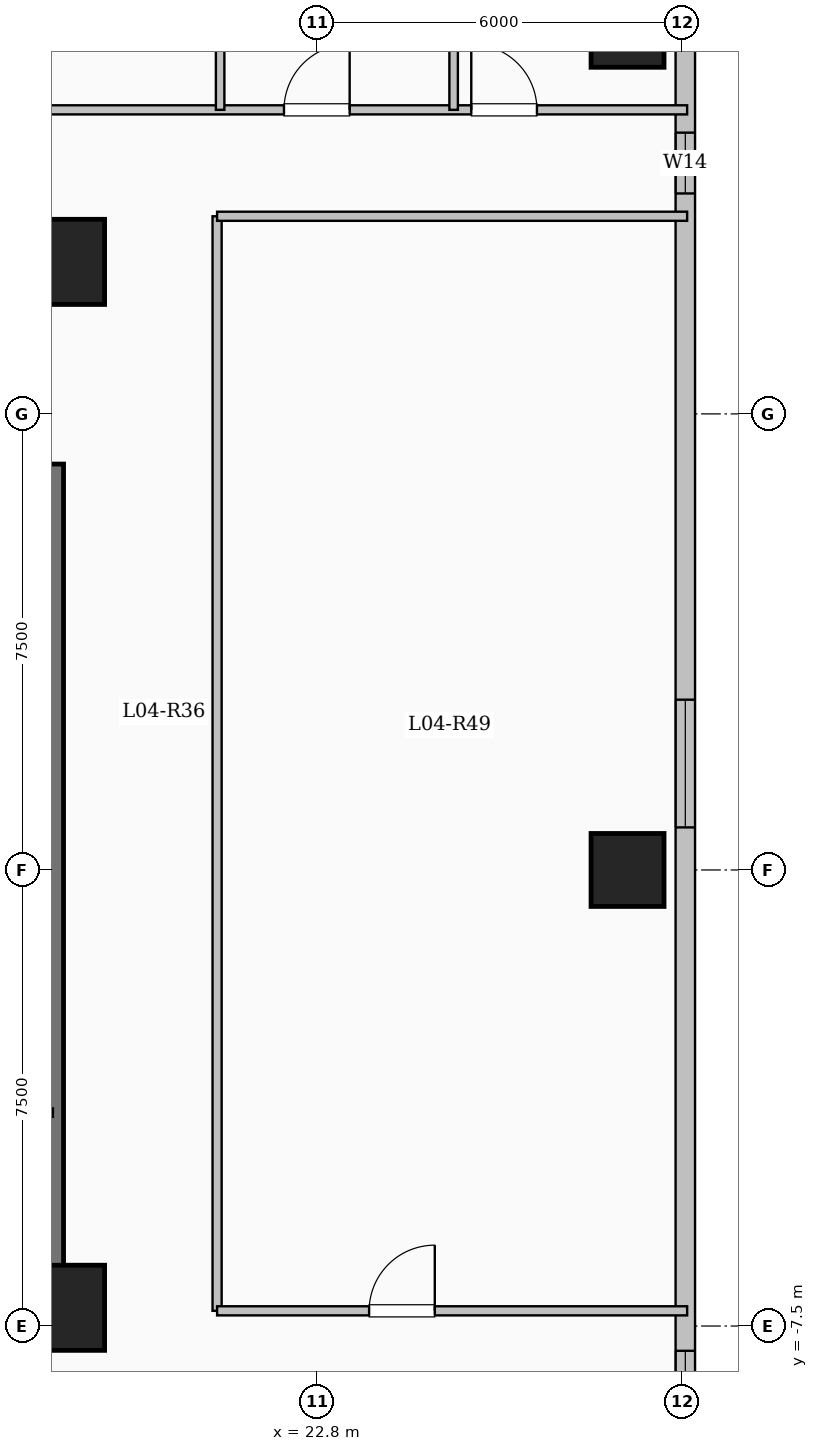
"""IFC4 building model, lengths in metres.
Left out: names, types, materials, properties, quantities, classifications, styles, units other than length and angle.
Written with IfcOpenShell. Run it as: python <this file> out.ifc"""

import sys

from ifc_helpers import new_model, si_unit, direction, frame, frame_2d, origin, origin_2d, place, context, subcontext, project, spatial, rectangle, extrude, element, fill, save


model = new_model("IFC4")
c1 = context("Model", 3, precision=1e-05, world=origin(), true_north=direction((0.0, 1.0)))
c2 = subcontext(c1, "Body", "Model", "MODEL_VIEW")
j1 = project(units=[si_unit("LENGTHUNIT", "METRE"), si_unit("PLANEANGLEUNIT", "RADIAN")], contexts=[c1])
p1 = place(None, origin())
s1 = spatial("IfcSite", under=j1, at=p1, CompositionType="ELEMENT")
p2 = place(p1, origin())
s2 = spatial("IfcBuilding", under=s1, at=p2, CompositionType="ELEMENT")
p3 = place(p2, frame((0.0, 0.0, 18.9)))
s3 = spatial("IfcBuildingStorey", under=s2, at=p3, CompositionType="ELEMENT", Elevation=18.9)
for number, where, z_axis, x_axis in (
    (1, (18.6, -7.2, 0.0), (0.0, 0.0, 1.0), (1.0, 0.0, 0.0)),
    (2, (18.6, 10.0, 0.0), (0.0, 0.0, 1.0), (1.0, 0.0, 0.0)),
):
    element("IfcColumn", number, at=place(p3, frame(where, z_axis=z_axis, x_axis=x_axis)), inside=s3, PredefinedType="COLUMN", context=c2, shape_type="SweptSolid", body=[
        extrude(rectangle(XDim=1.4, YDim=1.4, at=origin_2d()), origin(), (0.0, 0.0, 1.0), 5.1),
    ])
for number, where, z_axis, x_axis in (
    (3, (27.9, 0.0, 0.0), (0.0, 0.0, 1.0), (1.0, 0.0, 0.0)),
    (4, (27.9, 13.8, 0.0), (0.0, 0.0, 1.0), (1.0, 0.0, 0.0)),
):
    element("IfcColumn", number, at=place(p3, frame(where, z_axis=z_axis, x_axis=x_axis)), inside=s3, PredefinedType="COLUMN", context=c2, shape_type="SweptSolid", body=[
        extrude(rectangle(XDim=1.2, YDim=1.2, at=origin_2d()), origin(), (0.0, 0.0, 1.0), 5.1),
    ])
p4 = place(p3, frame((28.85, 26.25, 0.0), z_axis=(0.0, 0.0, 1.0), x_axis=(0.0, -1.0, 0.0)))
e5 = element("IfcWall", 5, at=p4, inside=s3, PredefinedType="SOLIDWALL", context=c2, shape_type="SweptSolid", body=[
    extrude(rectangle(XDim=52.5, YDim=0.32, at=frame_2d((26.25, 0.0))), origin(), (0.0, 0.0, 1.0), 4.85),
])
p5 = place(p4, frame((5.8, 0.0, 0.9)))
e6 = element("IfcOpeningElement", 6, at=p5, cuts=e5, PredefinedType="OPENING", context=c2, shape_type="SweptSolid", body=[
    extrude(rectangle(XDim=2.1, YDim=2.0, at=frame_2d((1.05, 1.0))), frame((0.0, 0.17, 0.0), z_axis=(0.0, -1.0, 0.0), x_axis=(1.0, 0.0, 0.0)), (0.0, 0.0, 1.0), 0.34),
])
p6 = place(p4, frame((14.125, 0.0, 0.95)))
e7 = element("IfcOpeningElement", 7, at=p6, cuts=e5, PredefinedType="OPENING", context=c2, shape_type="SweptSolid", body=[
    extrude(rectangle(XDim=1.0, YDim=1.5, at=frame_2d((0.5, 0.75))), frame((0.0, 0.17, 0.0), z_axis=(0.0, -1.0, 0.0), x_axis=(1.0, 0.0, 0.0)), (0.0, 0.0, 1.0), 0.34),
])
p7 = place(p4, frame((23.45, 0.0, 0.9)))
e8 = element("IfcOpeningElement", 8, at=p7, cuts=e5, PredefinedType="OPENING", context=c2, shape_type="SweptSolid", body=[
    extrude(rectangle(XDim=2.1, YDim=2.0, at=frame_2d((1.05, 1.0))), frame((0.0, 0.17, 0.0), z_axis=(0.0, -1.0, 0.0), x_axis=(1.0, 0.0, 0.0)), (0.0, 0.0, 1.0), 0.34),
])
p8 = place(p4, frame((34.157, 0.0, 0.9)))
e9 = element("IfcOpeningElement", 9, at=p8, cuts=e5, PredefinedType="OPENING", context=c2, shape_type="SweptSolid", body=[
    extrude(rectangle(XDim=1.7, YDim=1.9, at=frame_2d((0.85, 0.95))), frame((0.0, 0.17, 0.0), z_axis=(0.0, -1.0, 0.0), x_axis=(1.0, 0.0, 0.0)), (0.0, 0.0, 1.0), 0.34),
])
p9 = place(p3, frame((18.45, -7.375, 0.0), z_axis=(0.0, 0.0, 1.0), x_axis=(0.0, 1.0, 0.0)))
e10 = element("IfcWall", 10, at=p9, inside=s3, PredefinedType="SHEAR", context=c2, shape_type="SweptSolid", body=[
    extrude(rectangle(XDim=14.05, YDim=0.35, at=frame_2d((7.025, 0.0))), origin(), (0.0, 0.0, 1.0), 5.1),
])
p10 = place(p3, frame((10.075, -7.2, 0.0), z_axis=(0.0, 0.0, 1.0), x_axis=(1.0, 0.0, 0.0)))
e11 = element("IfcWall", 11, at=p10, inside=s3, PredefinedType="SHEAR", context=c2, shape_type="SweptSolid", body=[
    extrude(rectangle(XDim=8.55, YDim=0.35, at=frame_2d((4.275, 0.0))), origin(), (0.0, 0.0, 1.0), 5.1),
])
p11 = place(p3, frame((3.85, 12.5, 0.0), z_axis=(0.0, 0.0, 1.0), x_axis=(1.0, 0.0, 0.0)))
e12 = element("IfcWall", 12, at=p11, inside=s3, PredefinedType="PARTITIONING", context=c2, shape_type="SweptSolid", body=[
    extrude(rectangle(XDim=25.03, YDim=0.15, at=frame_2d((12.515, 0.0))), origin(), (0.0, 0.0, 1.0), 4.85),
])
p12 = place(p11, frame((1.2, 0.0, 0.0)))
e13 = element("IfcOpeningElement", 13, at=p12, cuts=e12, PredefinedType="OPENING", context=c2, shape_type="SweptSolid", body=[
    extrude(rectangle(XDim=0.95, YDim=2.15, at=frame_2d((0.475, 1.075))), frame((0.0, 0.085, 0.0), z_axis=(0.0, -1.0, 0.0), x_axis=(1.0, 0.0, 0.0)), (0.0, 0.0, 1.0), 0.17),
])
p13 = place(p11, frame((4.6, 0.0, 0.0)))
e14 = element("IfcOpeningElement", 14, at=p13, cuts=e12, PredefinedType="OPENING", context=c2, shape_type="SweptSolid", body=[
    extrude(rectangle(XDim=0.95, YDim=2.15, at=frame_2d((0.475, 1.075))), frame((0.0, 0.085, 0.0), z_axis=(0.0, -1.0, 0.0), x_axis=(1.0, 0.0, 0.0)), (0.0, 0.0, 1.0), 0.17),
])
p14 = place(p11, frame((9.1, 0.0, 0.0)))
e15 = element("IfcOpeningElement", 15, at=p14, cuts=e12, PredefinedType="OPENING", context=c2, shape_type="SweptSolid", body=[
    extrude(rectangle(XDim=0.95, YDim=2.15, at=frame_2d((0.475, 1.075))), frame((0.0, 0.085, 0.0), z_axis=(0.0, -1.0, 0.0), x_axis=(1.0, 0.0, 0.0)), (0.0, 0.0, 1.0), 0.17),
])
p15 = place(p11, frame((18.4, 0.0, 0.0)))
e16 = element("IfcOpeningElement", 16, at=p15, cuts=e12, PredefinedType="OPENING", context=c2, shape_type="SweptSolid", body=[
    extrude(rectangle(XDim=1.08, YDim=2.15, at=frame_2d((0.54, 1.075))), frame((0.0, 0.085, 0.0), z_axis=(0.0, -1.0, 0.0), x_axis=(1.0, 0.0, 0.0)), (0.0, 0.0, 1.0), 0.17),
])
p16 = place(p11, frame((21.48, 0.0, 0.0)))
e17 = element("IfcOpeningElement", 17, at=p16, cuts=e12, PredefinedType="OPENING", context=c2, shape_type="SweptSolid", body=[
    extrude(rectangle(XDim=1.08, YDim=2.15, at=frame_2d((0.54, 1.075))), frame((0.0, 0.085, 0.0), z_axis=(0.0, -1.0, 0.0), x_axis=(1.0, 0.0, 0.0)), (0.0, 0.0, 1.0), 0.17),
])
p17 = place(p3, frame((21.15, -7.25, 0.0), z_axis=(0.0, 0.0, 1.0), x_axis=(0.0, 1.0, 0.0)))
e18 = element("IfcWall", 18, at=p17, inside=s3, PredefinedType="PARTITIONING", context=c2, shape_type="SweptSolid", body=[
    extrude(rectangle(XDim=18.0, YDim=0.15, at=frame_2d((9.0, 0.0))), origin(), (0.0, 0.0, 1.0), 4.85),
])
for number, where, z_axis, x_axis in (
    (19, (21.2, 12.5, 0.0), (0.0, 0.0, 1.0), (0.0, 1.0, 0.0)),
    (20, (25.04, 12.5, 0.0), (0.0, 0.0, 1.0), (0.0, 1.0, 0.0)),
):
    element("IfcWall", number, at=place(p3, frame(where, z_axis=z_axis, x_axis=x_axis)), inside=s3, PredefinedType="PARTITIONING", context=c2, shape_type="SweptSolid", body=[
        extrude(rectangle(XDim=13.78, YDim=0.14, at=frame_2d((6.89, 0.0))), origin(), (0.0, 0.0, 1.0), 4.85),
    ])
p18 = place(p3, frame((21.15, -7.25, 0.0), z_axis=(0.0, 0.0, 1.0), x_axis=(1.0, 0.0, 0.0)))
e21 = element("IfcWall", 21, at=p18, inside=s3, PredefinedType="PARTITIONING", context=c2, shape_type="SweptSolid", body=[
    extrude(rectangle(XDim=7.73, YDim=0.15, at=frame_2d((3.865, 0.0))), origin(), (0.0, 0.0, 1.0), 4.85),
])
p19 = place(p18, frame((2.5, 0.0, 0.0)))
e22 = element("IfcOpeningElement", 22, at=p19, cuts=e21, PredefinedType="OPENING", context=c2, shape_type="SweptSolid", body=[
    extrude(rectangle(XDim=1.08, YDim=2.15, at=frame_2d((0.54, 1.075))), frame((0.0, 0.085, 0.0), z_axis=(0.0, -1.0, 0.0), x_axis=(1.0, 0.0, 0.0)), (0.0, 0.0, 1.0), 0.17),
])
p20 = place(p3, frame((21.15, 10.75, 0.0), z_axis=(0.0, 0.0, 1.0), x_axis=(1.0, 0.0, 0.0)))
e23 = element("IfcWall", 23, at=p20, inside=s3, PredefinedType="PARTITIONING", context=c2, shape_type="SweptSolid", body=[
    extrude(rectangle(XDim=7.73, YDim=0.15, at=frame_2d((3.865, 0.0))), origin(), (0.0, 0.0, 1.0), 4.85),
])
p21 = place(p6, origin())
e24 = element("IfcWindow", 24, at=p21, inside=s3, PartitioningType="SINGLE_PANEL", PredefinedType="WINDOW", context=c2, shape_type="SweptSolid", body=[
    extrude(rectangle(XDim=1.0, YDim=1.5, at=frame_2d((0.5, 0.75))), frame((0.0, 0.03, 0.0), z_axis=(0.0, -1.0, 0.0), x_axis=(1.0, 0.0, 0.0)), (0.0, 0.0, 1.0), 0.06),
])
fill(e7, e24)
p22 = place(p7, origin())
e25 = element("IfcWindow", 25, at=p22, inside=s3, PartitioningType="SINGLE_PANEL", PredefinedType="WINDOW", context=c2, shape_type="SweptSolid", body=[
    extrude(rectangle(XDim=2.1, YDim=2.0, at=frame_2d((1.05, 1.0))), frame((0.0, 0.03, 0.0), z_axis=(0.0, -1.0, 0.0), x_axis=(1.0, 0.0, 0.0)), (0.0, 0.0, 1.0), 0.06),
])
fill(e8, e25)
p23 = place(p8, origin())
e26 = element("IfcWindow", 26, at=p23, inside=s3, PartitioningType="SINGLE_PANEL", PredefinedType="WINDOW", context=c2, shape_type="SweptSolid", body=[
    extrude(rectangle(XDim=1.7, YDim=1.9, at=frame_2d((0.85, 0.95))), frame((0.0, 0.03, 0.0), z_axis=(0.0, -1.0, 0.0), x_axis=(1.0, 0.0, 0.0)), (0.0, 0.0, 1.0), 0.06),
])
fill(e9, e26)
p24 = place(p15, origin())
e27 = element("IfcDoor", 27, at=p24, inside=s3, OperationType="SINGLE_SWING_RIGHT", PredefinedType="DOOR", context=c2, shape_type="SweptSolid", body=[
    extrude(rectangle(XDim=1.08, YDim=2.15, at=frame_2d((0.54, 1.075))), frame((0.0, 0.025, 0.0), z_axis=(0.0, -1.0, 0.0), x_axis=(1.0, 0.0, 0.0)), (0.0, 0.0, 1.0), 0.05),
])
fill(e16, e27)
p25 = place(p16, origin())
e28 = element("IfcDoor", 28, at=p25, inside=s3, OperationType="SINGLE_SWING_LEFT", PredefinedType="DOOR", context=c2, shape_type="SweptSolid", body=[
    extrude(rectangle(XDim=1.08, YDim=2.15, at=frame_2d((0.54, 1.075))), frame((0.0, 0.025, 0.0), z_axis=(0.0, -1.0, 0.0), x_axis=(1.0, 0.0, 0.0)), (0.0, 0.0, 1.0), 0.05),
])
fill(e17, e28)
p26 = place(p19, origin())
e29 = element("IfcDoor", 29, at=p26, inside=s3, OperationType="SINGLE_SWING_RIGHT", PredefinedType="DOOR", context=c2, shape_type="SweptSolid", body=[
    extrude(rectangle(XDim=1.08, YDim=2.15, at=frame_2d((0.54, 1.075))), frame((0.0, 0.025, 0.0), z_axis=(0.0, -1.0, 0.0), x_axis=(1.0, 0.0, 0.0)), (0.0, 0.0, 1.0), 0.05),
])
fill(e22, e29)
save(model, sys.argv[1])
